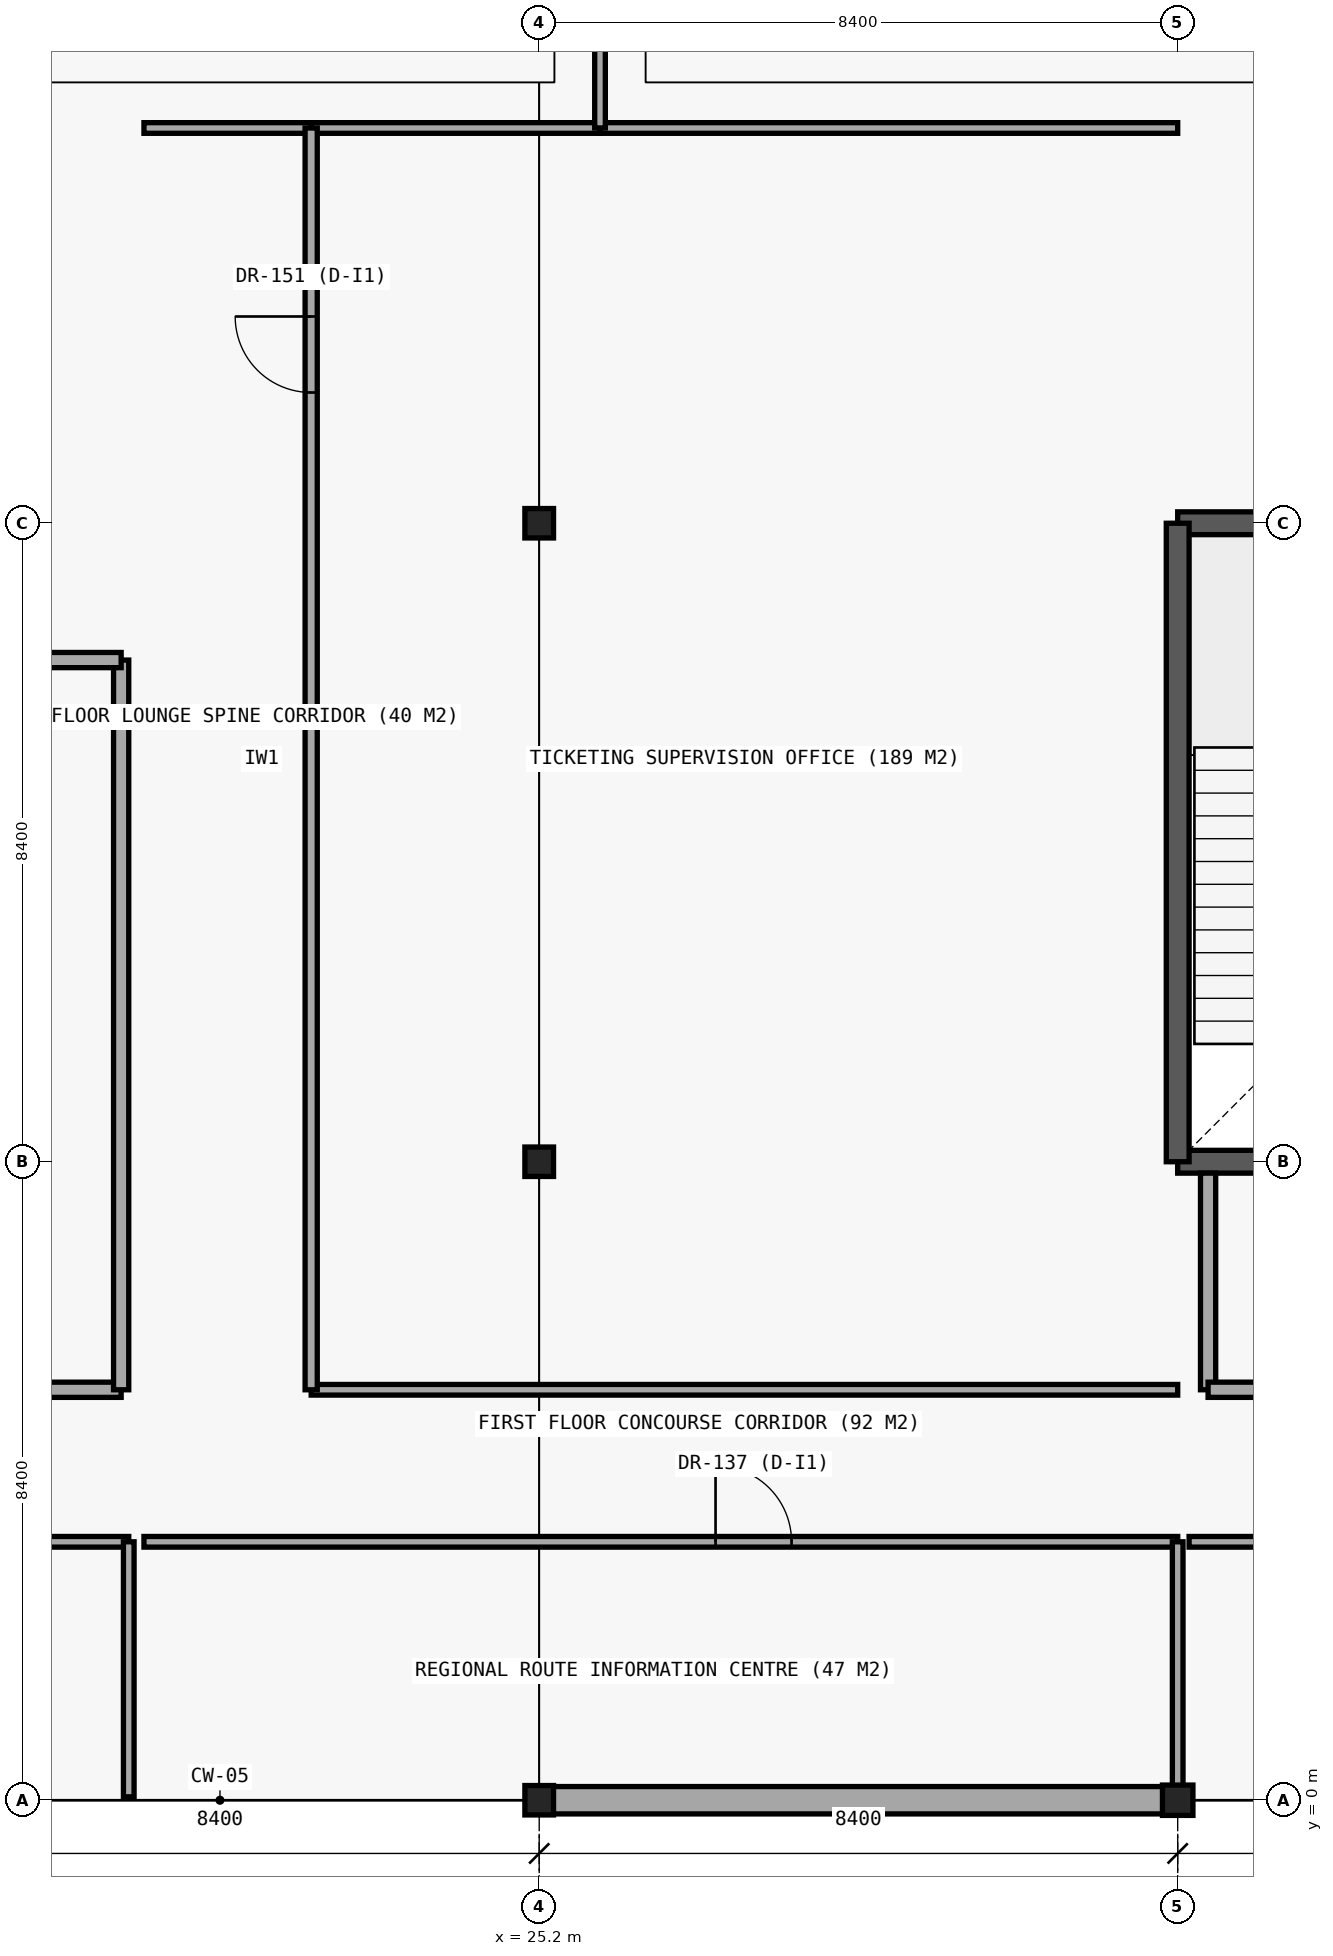
"""IFC4 building model, lengths in metres.
Left out: names, types, materials, properties, quantities, classifications, styles, units other than length and angle.
Written with IfcOpenShell. Run it as: python <this file> out.ifc"""

import sys

from ifc_helpers import new_model, si_unit, direction, frame, frame_2d, origin, origin_2d, place, context, subcontext, project, spatial, rectangle, i_section, extrude, element, fill, save


model = new_model("IFC4")
c1 = context("Model", 3, precision=1e-05, world=origin(), true_north=direction((0.0, 1.0)))
c2 = subcontext(c1, "Body", "Model", "MODEL_VIEW")
j1 = project(units=[si_unit("LENGTHUNIT", "METRE"), si_unit("PLANEANGLEUNIT", "RADIAN")], contexts=[c1])
p1 = place(None, origin())
s1 = spatial("IfcSite", under=j1, at=p1, CompositionType="ELEMENT")
p2 = place(p1, origin())
s2 = spatial("IfcBuilding", under=s1, at=p2, CompositionType="ELEMENT")
p3 = place(p2, frame((0.0, 0.0, 4.8)))
s3 = spatial("IfcBuildingStorey", under=s2, at=p3, CompositionType="ELEMENT", Elevation=4.8)
p4 = place(p3, frame((33.6, 8.4, 0.0), z_axis=(0.0, 0.0, 1.0), x_axis=(1.0, 0.0, 0.0)))
e1 = element("IfcWall", 1, at=p4, inside=s3, PredefinedType="SHEAR", context=c2, shape_type="SweptSolid", body=[
    extrude(rectangle(XDim=8.4, YDim=0.3, at=frame_2d((4.2, 0.0))), origin(), (0.0, 0.0, 1.0), 4.2),
])
p5 = place(p4, frame((1.8, 0.0, 0.0)))
e2 = element("IfcOpeningElement", 2, at=p5, cuts=e1, PredefinedType="OPENING", context=c2, shape_type="SweptSolid", body=[
    extrude(rectangle(XDim=1.35, YDim=2.2, at=frame_2d((0.675, 1.1))), frame((0.0, 0.16, 0.0), z_axis=(0.0, -1.0, 0.0), x_axis=(1.0, 0.0, 0.0)), (0.0, 0.0, 1.0), 0.32),
])
p6 = place(p4, frame((6.0, 0.0, 0.0)))
e3 = element("IfcOpeningElement", 3, at=p6, cuts=e1, PredefinedType="OPENING", context=c2, shape_type="SweptSolid", body=[
    extrude(rectangle(XDim=1.1, YDim=2.2, at=frame_2d((0.55, 1.1))), frame((0.0, 0.16, 0.0), z_axis=(0.0, -1.0, 0.0), x_axis=(1.0, 0.0, 0.0)), (0.0, 0.0, 1.0), 0.32),
])
p7 = place(p3, frame((42.0, 16.8, 0.0), z_axis=(0.0, 0.0, 1.0), x_axis=(-1.0, 0.0, 0.0)))
e4 = element("IfcWall", 4, at=p7, inside=s3, PredefinedType="SHEAR", context=c2, shape_type="SweptSolid", body=[
    extrude(rectangle(XDim=8.4, YDim=0.3, at=frame_2d((4.2, 0.0))), origin(), (0.0, 0.0, 1.0), 4.2),
])
p8 = place(p3, frame((33.6, 16.8, 0.0), z_axis=(0.0, 0.0, 1.0), x_axis=(0.0, -1.0, 0.0)))
e5 = element("IfcWall", 5, at=p8, inside=s3, PredefinedType="SHEAR", context=c2, shape_type="SweptSolid", body=[
    extrude(rectangle(XDim=8.4, YDim=0.3, at=frame_2d((4.2, 0.0))), origin(), (0.0, 0.0, 1.0), 4.2),
])
for number, where, z_axis, x_axis in (
    (6, (25.2, 0.0, 0.0), (0.0, 0.0, 1.0), (1.0, 0.0, 0.0)),
    (7, (25.2, 8.4, 0.0), (0.0, 0.0, 1.0), (1.0, 0.0, 0.0)),
    (8, (25.2, 16.8, 0.0), (0.0, 0.0, 1.0), (1.0, 0.0, 0.0)),
):
    element("IfcColumn", number, at=place(p3, frame(where, z_axis=z_axis, x_axis=x_axis)), inside=s3, PredefinedType="COLUMN", context=c2, shape_type="SweptSolid", body=[
        extrude(i_section(OverallWidth=0.377, OverallDepth=0.387, WebThickness=0.022, FlangeThickness=0.036, FilletRadius=0.015, at=origin_2d()), origin(), (0.0, 0.0, 1.0), 4.2),
    ])
p9 = place(p3, frame((33.6, 0.0, 0.0), z_axis=(0.0, 0.0, 1.0), x_axis=(1.0, 0.0, 0.0)))
e9 = element("IfcColumn", 9, at=p9, inside=s3, PredefinedType="COLUMN", context=c2, shape_type="SweptSolid", body=[
    extrude(i_section(OverallWidth=0.401, OverallDepth=0.399, WebThickness=0.025, FlangeThickness=0.04, FilletRadius=0.015, at=origin_2d()), origin(), (0.0, 0.0, 1.0), 4.2),
])
p10 = place(p3, frame((25.2, 0.0, 0.0), z_axis=(0.0, 0.0, 1.0), x_axis=(1.0, 0.0, 0.0)))
e10 = element("IfcWall", 10, at=p10, inside=s3, PredefinedType="STANDARD", context=c2, shape_type="SweptSolid", body=[
    extrude(rectangle(XDim=8.4, YDim=0.36, at=frame_2d((4.2, 0.0))), origin(), (0.0, 0.0, 1.0), 3.62),
])
p11 = place(p3, frame((8.8, 5.4, 0.0), z_axis=(0.0, 0.0, 1.0), x_axis=(1.0, 0.0, 0.0)))
e11 = element("IfcWall", 11, at=p11, inside=s3, PredefinedType="PARTITIONING", context=c2, shape_type="SweptSolid", body=[
    extrude(rectangle(XDim=10.9, YDim=0.2, at=frame_2d((5.45, 0.0))), origin(), (0.0, 0.0, 1.0), 3.52),
])
p12 = place(p11, frame((3.2, 0.0, 0.0)))
e12 = element("IfcOpeningElement", 12, at=p12, cuts=e11, PredefinedType="OPENING", context=c2, shape_type="SweptSolid", body=[
    extrude(rectangle(XDim=1.5, YDim=2.2, at=frame_2d((0.75, 1.1))), frame((0.0, 0.11, 0.0), z_axis=(0.0, -1.0, 0.0), x_axis=(1.0, 0.0, 0.0)), (0.0, 0.0, 1.0), 0.22),
])
p13 = place(p3, frame((19.7, 5.4, 0.0), z_axis=(0.0, 0.0, 1.0), x_axis=(0.0, 1.0, 0.0)))
e13 = element("IfcWall", 13, at=p13, inside=s3, PredefinedType="PARTITIONING", context=c2, shape_type="SweptSolid", body=[
    extrude(rectangle(XDim=9.6, YDim=0.2, at=frame_2d((4.8, 0.0))), origin(), (0.0, 0.0, 1.0), 3.52),
])
p14 = place(p3, frame((16.96, 15.0, 0.0), z_axis=(0.0, 0.0, 1.0), x_axis=(1.0, 0.0, 0.0)))
e14 = element("IfcWall", 14, at=p14, inside=s3, PredefinedType="PARTITIONING", context=c2, shape_type="SweptSolid", body=[
    extrude(rectangle(XDim=2.74, YDim=0.2, at=frame_2d((1.37, 0.0))), origin(), (0.0, 0.0, 1.0), 3.52),
])
p15 = place(p3, frame((34.0, 5.4, 0.0), z_axis=(0.0, 0.0, 1.0), x_axis=(0.0, 1.0, 0.0)))
e15 = element("IfcWall", 15, at=p15, inside=s3, PredefinedType="PARTITIONING", context=c2, shape_type="SweptSolid", body=[
    extrude(rectangle(XDim=2.85, YDim=0.2, at=frame_2d((1.425, 0.0))), origin(), (0.0, 0.0, 1.0), 3.49),
])
p16 = place(p3, frame((34.0, 5.4, 0.0), z_axis=(0.0, 0.0, 1.0), x_axis=(1.0, 0.0, 0.0)))
e16 = element("IfcWall", 16, at=p16, inside=s3, PredefinedType="PARTITIONING", context=c2, shape_type="SweptSolid", body=[
    extrude(rectangle(XDim=7.6, YDim=0.2, at=frame_2d((3.8, 0.0))), origin(), (0.0, 0.0, 1.0), 3.52),
])
p17 = place(p16, frame((3.05, 0.0, 0.0)))
e17 = element("IfcOpeningElement", 17, at=p17, cuts=e16, PredefinedType="OPENING", context=c2, shape_type="SweptSolid", body=[
    extrude(rectangle(XDim=1.5, YDim=2.2, at=frame_2d((0.75, 1.1))), frame((0.0, 0.11, 0.0), z_axis=(0.0, -1.0, 0.0), x_axis=(1.0, 0.0, 0.0)), (0.0, 0.0, 1.0), 0.22),
])
p18 = place(p3, frame((8.55, 3.4, 0.0), z_axis=(0.0, 0.0, 1.0), x_axis=(1.0, 0.0, 0.0)))
e18 = element("IfcWall", 18, at=p18, inside=s3, PredefinedType="PARTITIONING", context=c2, shape_type="SweptSolid", body=[
    extrude(rectangle(XDim=11.25, YDim=0.14, at=frame_2d((5.625, 0.0))), origin(), (0.0, 0.0, 1.0), 3.5),
])
p19 = place(p18, frame((1.92, 0.0, 0.0)))
e19 = element("IfcOpeningElement", 19, at=p19, cuts=e18, PredefinedType="OPENING", context=c2, shape_type="SweptSolid", body=[
    extrude(rectangle(XDim=1.0, YDim=2.15, at=frame_2d((0.5, 1.075))), frame((0.0, 0.08, 0.0), z_axis=(0.0, -1.0, 0.0), x_axis=(1.0, 0.0, 0.0)), (0.0, 0.0, 1.0), 0.16),
])
p20 = place(p3, frame((20.0, 3.4, 0.0), z_axis=(0.0, 0.0, 1.0), x_axis=(1.0, 0.0, 0.0)))
e20 = element("IfcWall", 20, at=p20, inside=s3, PredefinedType="PARTITIONING", context=c2, shape_type="SweptSolid", body=[
    extrude(rectangle(XDim=13.6, YDim=0.14, at=frame_2d((6.8, 0.0))), origin(), (0.0, 0.0, 1.0), 3.5),
])
p21 = place(p20, frame((7.52, 0.0, 0.0)))
e21 = element("IfcOpeningElement", 21, at=p21, cuts=e20, PredefinedType="OPENING", context=c2, shape_type="SweptSolid", body=[
    extrude(rectangle(XDim=1.0, YDim=2.15, at=frame_2d((0.5, 1.075))), frame((0.0, 0.08, 0.0), z_axis=(0.0, -1.0, 0.0), x_axis=(1.0, 0.0, 0.0)), (0.0, 0.0, 1.0), 0.16),
])
p22 = place(p3, frame((33.75, 3.4, 0.0), z_axis=(0.0, 0.0, 1.0), x_axis=(1.0, 0.0, 0.0)))
e22 = element("IfcWall", 22, at=p22, inside=s3, PredefinedType="PARTITIONING", context=c2, shape_type="SweptSolid", body=[
    extrude(rectangle(XDim=8.25, YDim=0.14, at=frame_2d((4.125, 0.0))), origin(), (0.0, 0.0, 1.0), 3.5),
])
p23 = place(p22, frame((1.92, 0.0, 0.0)))
e23 = element("IfcOpeningElement", 23, at=p23, cuts=e22, PredefinedType="OPENING", context=c2, shape_type="SweptSolid", body=[
    extrude(rectangle(XDim=1.15, YDim=2.15, at=frame_2d((0.575, 1.075))), frame((0.0, 0.08, 0.0), z_axis=(0.0, -1.0, 0.0), x_axis=(1.0, 0.0, 0.0)), (0.0, 0.0, 1.0), 0.16),
])
p24 = place(p3, frame((22.2, 5.4, 0.0), z_axis=(0.0, 0.0, 1.0), x_axis=(1.0, 0.0, 0.0)))
e24 = element("IfcWall", 24, at=p24, inside=s3, PredefinedType="PARTITIONING", context=c2, shape_type="SweptSolid", body=[
    extrude(rectangle(XDim=11.4, YDim=0.14, at=frame_2d((5.7, 0.0))), origin(), (0.0, 0.0, 1.0), 3.5),
])
p25 = place(p3, frame((20.0, 22.0, 0.0), z_axis=(0.0, 0.0, 1.0), x_axis=(1.0, 0.0, 0.0)))
e25 = element("IfcWall", 25, at=p25, inside=s3, PredefinedType="PARTITIONING", context=c2, shape_type="SweptSolid", body=[
    extrude(rectangle(XDim=2.2, YDim=0.14, at=frame_2d((1.1, 0.0))), origin(), (0.0, 0.0, 1.0), 3.5),
])
p26 = place(p3, frame((22.2, 22.0, 0.0), z_axis=(0.0, 0.0, 1.0), x_axis=(1.0, 0.0, 0.0)))
e26 = element("IfcWall", 26, at=p26, inside=s3, PredefinedType="PARTITIONING", context=c2, shape_type="SweptSolid", body=[
    extrude(rectangle(XDim=3.8, YDim=0.14, at=frame_2d((1.9, 0.0))), origin(), (0.0, 0.0, 1.0), 3.5),
])
p27 = place(p3, frame((26.0, 22.0, 0.0), z_axis=(0.0, 0.0, 1.0), x_axis=(1.0, 0.0, 0.0)))
e27 = element("IfcWall", 27, at=p27, inside=s3, PredefinedType="PARTITIONING", context=c2, shape_type="SweptSolid", body=[
    extrude(rectangle(XDim=7.6, YDim=0.14, at=frame_2d((3.8, 0.0))), origin(), (0.0, 0.0, 1.0), 3.5),
])
p28 = place(p3, frame((19.8, 0.045, 0.0), z_axis=(0.0, 0.0, 1.0), x_axis=(0.0, 1.0, 0.0)))
e28 = element("IfcWall", 28, at=p28, inside=s3, PredefinedType="PARTITIONING", context=c2, shape_type="SweptSolid", body=[
    extrude(rectangle(XDim=3.355, YDim=0.14, at=frame_2d((1.677, 0.0))), origin(), (0.0, 0.0, 1.0), 3.5),
])
p29 = place(p3, frame((22.2, 5.4, 0.0), z_axis=(0.0, 0.0, 1.0), x_axis=(0.0, 1.0, 0.0)))
e29 = element("IfcWall", 29, at=p29, inside=s3, PredefinedType="PARTITIONING", context=c2, shape_type="SweptSolid", body=[
    extrude(rectangle(XDim=16.6, YDim=0.16, at=frame_2d((8.3, 0.0))), origin(), (0.0, 0.0, 1.0), 3.5),
])
p30 = place(p29, frame((13.12, 0.0, 0.0)))
e30 = element("IfcOpeningElement", 30, at=p30, cuts=e29, PredefinedType="OPENING", context=c2, shape_type="SweptSolid", body=[
    extrude(rectangle(XDim=1.0, YDim=2.15, at=frame_2d((0.5, 1.075))), frame((0.0, 0.09, 0.0), z_axis=(0.0, -1.0, 0.0), x_axis=(1.0, 0.0, 0.0)), (0.0, 0.0, 1.0), 0.18),
])
p31 = place(p3, frame((26.0, 22.0, 0.0), z_axis=(0.0, 0.0, 1.0), x_axis=(0.0, 1.0, 0.0)))
e31 = element("IfcWall", 31, at=p31, inside=s3, PredefinedType="PARTITIONING", context=c2, shape_type="SweptSolid", body=[
    extrude(rectangle(XDim=3.05, YDim=0.14, at=frame_2d((1.525, 0.0))), origin(), (0.0, 0.0, 1.0), 3.5),
])
p32 = place(p3, frame((33.6, 0.185, 0.0), z_axis=(0.0, 0.0, 1.0), x_axis=(0.0, 1.0, 0.0)))
e32 = element("IfcWall", 32, at=p32, inside=s3, PredefinedType="PARTITIONING", context=c2, shape_type="SweptSolid", body=[
    extrude(rectangle(XDim=3.215, YDim=0.14, at=frame_2d((1.607, 0.0))), origin(), (0.0, 0.0, 1.0), 3.49),
])
p33 = place(p21, origin())
e33 = element("IfcDoor", 33, at=p33, inside=s3, OperationType="SINGLE_SWING_LEFT", PredefinedType="DOOR", context=c2, shape_type="SweptSolid", body=[
    extrude(rectangle(XDim=1.0, YDim=2.15, at=frame_2d((0.5, 1.075))), frame((0.0, 0.025, 0.0), z_axis=(0.0, -1.0, 0.0), x_axis=(1.0, 0.0, 0.0)), (0.0, 0.0, 1.0), 0.05),
])
fill(e21, e33)
p34 = place(p30, origin())
e34 = element("IfcDoor", 34, at=p34, inside=s3, OperationType="SINGLE_SWING_RIGHT", PredefinedType="DOOR", context=c2, shape_type="SweptSolid", body=[
    extrude(rectangle(XDim=1.0, YDim=2.15, at=frame_2d((0.5, 1.075))), frame((0.0, 0.025, 0.0), z_axis=(0.0, -1.0, 0.0), x_axis=(1.0, 0.0, 0.0)), (0.0, 0.0, 1.0), 0.05),
])
fill(e30, e34)
save(model, sys.argv[1])
